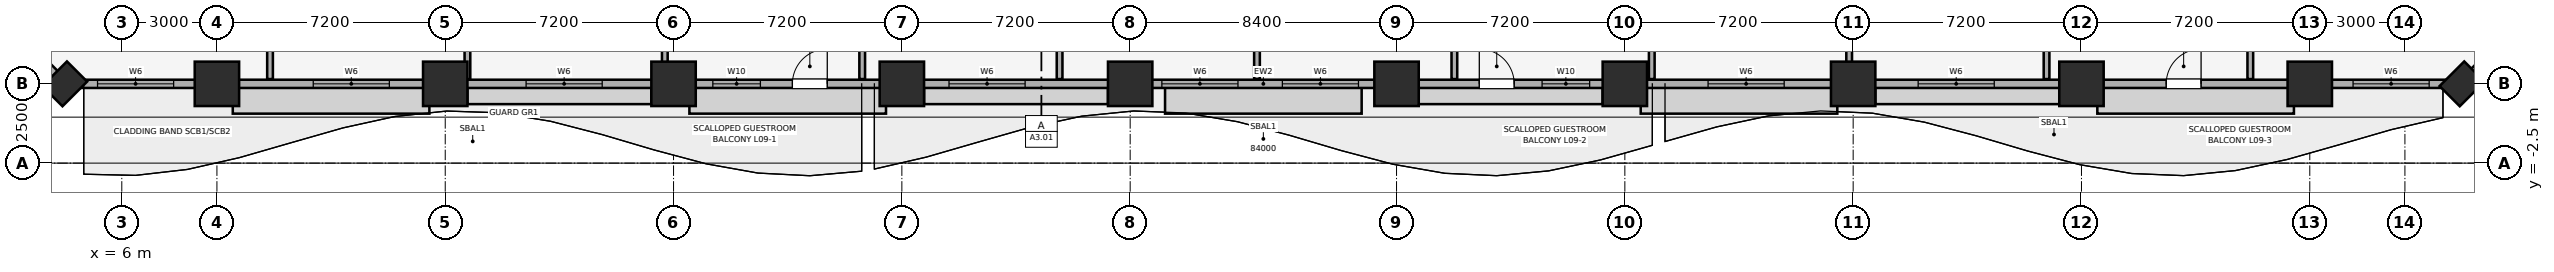
"""IFC4 building model, lengths in metres.
Left out: names, types, materials, properties, quantities, classifications, styles, units other than length and angle.
Written with IfcOpenShell. Run it as: python <this file> out.ifc"""

import sys

from ifc_helpers import new_model, si_unit, direction, frame, frame_2d, origin, origin_2d, place, context, subcontext, project, spatial, rectangle, extrude, element, fill, save


model = new_model("IFC4")
c1 = context("Model", 3, precision=1e-05, world=origin(), true_north=direction((0.0, 1.0)))
c2 = subcontext(c1, "Body", "Model", "MODEL_VIEW")
j1 = project(units=[si_unit("LENGTHUNIT", "METRE"), si_unit("PLANEANGLEUNIT", "RADIAN")], contexts=[c1])
p1 = place(None, origin())
s1 = spatial("IfcSite", under=j1, at=p1, CompositionType="ELEMENT")
p2 = place(p1, origin())
s2 = spatial("IfcBuilding", under=s1, at=p2, CompositionType="ELEMENT")
p3 = place(p2, frame((0.0, 0.0, 46.4)))
s3 = spatial("IfcBuildingStorey", under=s2, at=p3, CompositionType="ELEMENT", Elevation=46.4)
for number, where, z_axis, x_axis in (
    (1, (9.0, 0.0, 0.0), (0.0, 0.0, 1.0), (1.0, 0.0, 0.0)),
    (2, (16.2, 0.0, 0.0), (0.0, 0.0, 1.0), (1.0, 0.0, 0.0)),
    (3, (23.4, 0.0, 0.0), (0.0, 0.0, 1.0), (1.0, 0.0, 0.0)),
    (4, (30.6, 0.0, 0.0), (0.0, 0.0, 1.0), (1.0, 0.0, 0.0)),
    (5, (37.8, 0.0, 0.0), (0.0, 0.0, 1.0), (1.0, 0.0, 0.0)),
    (6, (46.2, 0.0, 0.0), (0.0, 0.0, 1.0), (1.0, 0.0, 0.0)),
    (7, (53.4, 0.0, 0.0), (0.0, 0.0, 1.0), (1.0, 0.0, 0.0)),
    (8, (60.6, 0.0, 0.0), (0.0, 0.0, 1.0), (1.0, 0.0, 0.0)),
    (9, (67.8, 0.0, 0.0), (0.0, 0.0, 1.0), (1.0, 0.0, 0.0)),
    (10, (75.0, 0.0, 0.0), (0.0, 0.0, 1.0), (1.0, 0.0, 0.0)),
):
    element("IfcColumn", number, at=place(p3, frame(where, z_axis=z_axis, x_axis=x_axis)), inside=s3, PredefinedType="COLUMN", context=c2, shape_type="SweptSolid", body=[
        extrude(rectangle(XDim=1.4, YDim=1.4, at=origin_2d()), origin(), (0.0, 0.0, 1.0), 3.51),
    ])
for number, where, z_axis, x_axis in (
    (11, (4.2, 0.0, 0.0), (0.0, 0.0, 1.0), (0.707, 0.707, 0.0)),
    (12, (79.8, 0.0, 0.0), (0.0, 0.0, 1.0), (0.707, 0.707, 0.0)),
):
    element("IfcColumn", number, at=place(p3, frame(where, z_axis=z_axis, x_axis=x_axis)), inside=s3, PredefinedType="PILASTER", context=c2, shape_type="SweptSolid", body=[
        extrude(rectangle(XDim=1.1, YDim=0.9, at=origin_2d()), origin(), (0.0, 0.0, 1.0), 3.51),
    ])
p4 = place(p3, frame((4.2, 0.0, 0.0), z_axis=(0.0, 0.0, 1.0), x_axis=(1.0, 0.0, 0.0)))
e13 = element("IfcWall", 13, at=p4, inside=s3, PredefinedType="SOLIDWALL", context=c2, shape_type="SweptSolid", body=[
    extrude(rectangle(XDim=75.6, YDim=0.26, at=frame_2d((37.8, 0.0))), origin(), (0.0, 0.0, 1.0), 2.56),
])
p5 = place(p4, frame((22.948, 0.0, 0.0)))
e14 = element("IfcOpeningElement", 14, at=p5, cuts=e13, PredefinedType="OPENING", context=c2, shape_type="SweptSolid", body=[
    extrude(rectangle(XDim=1.1, YDim=2.15, at=frame_2d((0.55, 1.075))), frame((0.0, 0.14, 0.0), z_axis=(0.0, -1.0, 0.0), x_axis=(1.0, 0.0, 0.0)), (0.0, 0.0, 1.0), 0.28),
])
p6 = place(p4, frame((44.61, 0.0, 0.0)))
e15 = element("IfcOpeningElement", 15, at=p6, cuts=e13, PredefinedType="OPENING", context=c2, shape_type="SweptSolid", body=[
    extrude(rectangle(XDim=1.1, YDim=2.15, at=frame_2d((0.55, 1.075))), frame((0.0, 0.14, 0.0), z_axis=(0.0, -1.0, 0.0), x_axis=(1.0, 0.0, 0.0)), (0.0, 0.0, 1.0), 0.28),
])
p7 = place(p4, frame((66.272, 0.0, 0.0)))
e16 = element("IfcOpeningElement", 16, at=p7, cuts=e13, PredefinedType="OPENING", context=c2, shape_type="SweptSolid", body=[
    extrude(rectangle(XDim=1.1, YDim=2.15, at=frame_2d((0.55, 1.075))), frame((0.0, 0.14, 0.0), z_axis=(0.0, -1.0, 0.0), x_axis=(1.0, 0.0, 0.0)), (0.0, 0.0, 1.0), 0.28),
])
p8 = place(p4, frame((1.035, 0.0, 0.85)))
e17 = element("IfcOpeningElement", 17, at=p8, cuts=e13, PredefinedType="OPENING", context=c2, shape_type="SweptSolid", body=[
    extrude(rectangle(XDim=2.4, YDim=1.5, at=frame_2d((1.2, 0.75))), frame((0.0, 0.14, 0.0), z_axis=(0.0, -1.0, 0.0), x_axis=(1.0, 0.0, 0.0)), (0.0, 0.0, 1.0), 0.28),
])
p9 = place(p4, frame((7.837, 0.0, 0.85)))
e18 = element("IfcOpeningElement", 18, at=p9, cuts=e13, PredefinedType="OPENING", context=c2, shape_type="SweptSolid", body=[
    extrude(rectangle(XDim=2.4, YDim=1.5, at=frame_2d((1.2, 0.75))), frame((0.0, 0.14, 0.0), z_axis=(0.0, -1.0, 0.0), x_axis=(1.0, 0.0, 0.0)), (0.0, 0.0, 1.0), 0.28),
])
p10 = place(p4, frame((14.55, 0.0, 0.85)))
e19 = element("IfcOpeningElement", 19, at=p10, cuts=e13, PredefinedType="OPENING", context=c2, shape_type="SweptSolid", body=[
    extrude(rectangle(XDim=2.4, YDim=1.5, at=frame_2d((1.2, 0.75))), frame((0.0, 0.14, 0.0), z_axis=(0.0, -1.0, 0.0), x_axis=(1.0, 0.0, 0.0)), (0.0, 0.0, 1.0), 0.28),
])
p11 = place(p4, frame((20.439, 0.0, 0.85)))
e20 = element("IfcOpeningElement", 20, at=p11, cuts=e13, PredefinedType="OPENING", context=c2, shape_type="SweptSolid", body=[
    extrude(rectangle(XDim=1.5, YDim=1.4, at=frame_2d((0.75, 0.7))), frame((0.0, 0.14, 0.0), z_axis=(0.0, -1.0, 0.0), x_axis=(1.0, 0.0, 0.0)), (0.0, 0.0, 1.0), 0.28),
])
p12 = place(p4, frame((27.887, 0.0, 0.85)))
e21 = element("IfcOpeningElement", 21, at=p12, cuts=e13, PredefinedType="OPENING", context=c2, shape_type="SweptSolid", body=[
    extrude(rectangle(XDim=2.4, YDim=1.5, at=frame_2d((1.2, 0.75))), frame((0.0, 0.14, 0.0), z_axis=(0.0, -1.0, 0.0), x_axis=(1.0, 0.0, 0.0)), (0.0, 0.0, 1.0), 0.28),
])
p13 = place(p4, frame((34.6, 0.0, 0.85)))
e22 = element("IfcOpeningElement", 22, at=p13, cuts=e13, PredefinedType="OPENING", context=c2, shape_type="SweptSolid", body=[
    extrude(rectangle(XDim=2.4, YDim=1.5, at=frame_2d((1.2, 0.75))), frame((0.0, 0.14, 0.0), z_axis=(0.0, -1.0, 0.0), x_axis=(1.0, 0.0, 0.0)), (0.0, 0.0, 1.0), 0.28),
])
p14 = place(p4, frame((38.399, 0.0, 0.85)))
e23 = element("IfcOpeningElement", 23, at=p14, cuts=e13, PredefinedType="OPENING", context=c2, shape_type="SweptSolid", body=[
    extrude(rectangle(XDim=2.4, YDim=1.5, at=frame_2d((1.2, 0.75))), frame((0.0, 0.14, 0.0), z_axis=(0.0, -1.0, 0.0), x_axis=(1.0, 0.0, 0.0)), (0.0, 0.0, 1.0), 0.28),
])
p15 = place(p4, frame((46.59, 0.0, 0.85)))
e24 = element("IfcOpeningElement", 24, at=p15, cuts=e13, PredefinedType="OPENING", context=c2, shape_type="SweptSolid", body=[
    extrude(rectangle(XDim=1.5, YDim=1.4, at=frame_2d((0.75, 0.7))), frame((0.0, 0.14, 0.0), z_axis=(0.0, -1.0, 0.0), x_axis=(1.0, 0.0, 0.0)), (0.0, 0.0, 1.0), 0.28),
])
p16 = place(p4, frame((51.824, 0.0, 0.85)))
e25 = element("IfcOpeningElement", 25, at=p16, cuts=e13, PredefinedType="OPENING", context=c2, shape_type="SweptSolid", body=[
    extrude(rectangle(XDim=2.4, YDim=1.5, at=frame_2d((1.2, 0.75))), frame((0.0, 0.14, 0.0), z_axis=(0.0, -1.0, 0.0), x_axis=(1.0, 0.0, 0.0)), (0.0, 0.0, 1.0), 0.28),
])
p17 = place(p4, frame((58.449, 0.0, 0.85)))
e26 = element("IfcOpeningElement", 26, at=p17, cuts=e13, PredefinedType="OPENING", context=c2, shape_type="SweptSolid", body=[
    extrude(rectangle(XDim=2.4, YDim=1.5, at=frame_2d((1.2, 0.75))), frame((0.0, 0.14, 0.0), z_axis=(0.0, -1.0, 0.0), x_axis=(1.0, 0.0, 0.0)), (0.0, 0.0, 1.0), 0.28),
])
p18 = place(p4, frame((72.165, 0.0, 0.85)))
e27 = element("IfcOpeningElement", 27, at=p18, cuts=e13, PredefinedType="OPENING", context=c2, shape_type="SweptSolid", body=[
    extrude(rectangle(XDim=2.4, YDim=1.5, at=frame_2d((1.2, 0.75))), frame((0.0, 0.14, 0.0), z_axis=(0.0, -1.0, 0.0), x_axis=(1.0, 0.0, 0.0)), (0.0, 0.0, 1.0), 0.28),
])
for number, where, z_axis, x_axis in (
    (28, (79.8, 0.0, 0.0), (0.0, 0.0, 1.0), (0.707, 0.707, 0.0)),
    (29, (0.0, 4.2, 0.0), (0.0, 0.0, 1.0), (0.707, -0.707, 0.0)),
):
    element("IfcWall", number, at=place(p3, frame(where, z_axis=z_axis, x_axis=x_axis)), inside=s3, PredefinedType="SOLIDWALL", context=c2, shape_type="SweptSolid", body=[
        extrude(rectangle(XDim=5.94, YDim=0.26, at=frame_2d((2.97, 0.0))), origin(), (0.0, 0.0, 1.0), 2.56),
    ])
for number, where, z_axis, x_axis in (
    (30, (10.675, 0.15, 0.0), (0.0, 0.0, 1.0), (0.0, 1.0, 0.0)),
    (31, (16.9, 0.15, 0.0), (0.0, 0.0, 1.0), (0.0, 1.0, 0.0)),
):
    element("IfcWall", number, at=place(p3, frame(where, z_axis=z_axis, x_axis=x_axis)), inside=s3, PredefinedType="PARTITIONING", context=c2, shape_type="SweptSolid", body=[
        extrude(rectangle(XDim=9.955, YDim=0.18, at=frame_2d((4.978, 0.0))), origin(), (0.0, 0.0, 1.0), 3.51),
    ])
p19 = place(p3, frame((23.125, 0.15, 0.0), z_axis=(0.0, 0.0, 1.0), x_axis=(0.0, 1.0, 0.0)))
e32 = element("IfcWall", 32, at=p19, inside=s3, PredefinedType="PARTITIONING", context=c2, shape_type="SweptSolid", body=[
    extrude(rectangle(XDim=9.955, YDim=0.18, at=frame_2d((4.978, 0.0))), origin(), (0.0, 0.0, 1.0), 2.88),
])
for number, where, z_axis, x_axis in (
    (33, (29.35, 0.15, 0.0), (0.0, 0.0, 1.0), (0.0, 1.0, 0.0)),
    (34, (35.574, 0.15, 0.0), (0.0, 0.0, 1.0), (0.0, 1.0, 0.0)),
):
    element("IfcWall", number, at=place(p3, frame(where, z_axis=z_axis, x_axis=x_axis)), inside=s3, PredefinedType="PARTITIONING", context=c2, shape_type="SweptSolid", body=[
        extrude(rectangle(XDim=9.955, YDim=0.18, at=frame_2d((4.978, 0.0))), origin(), (0.0, 0.0, 1.0), 3.51),
    ])
p20 = place(p3, frame((41.799, 0.15, 0.0), z_axis=(0.0, 0.0, 1.0), x_axis=(0.0, 1.0, 0.0)))
e35 = element("IfcWall", 35, at=p20, inside=s3, PredefinedType="PARTITIONING", context=c2, shape_type="SweptSolid", body=[
    extrude(rectangle(XDim=9.955, YDim=0.18, at=frame_2d((4.978, 0.0))), origin(), (0.0, 0.0, 1.0), 2.898),
])
for number, where, z_axis, x_axis in (
    (36, (48.024, 0.15, 0.0), (0.0, 0.0, 1.0), (0.0, 1.0, 0.0)),
    (37, (54.249, 0.15, 0.0), (0.0, 0.0, 1.0), (0.0, 1.0, 0.0)),
):
    element("IfcWall", number, at=place(p3, frame(where, z_axis=z_axis, x_axis=x_axis)), inside=s3, PredefinedType="PARTITIONING", context=c2, shape_type="SweptSolid", body=[
        extrude(rectangle(XDim=9.955, YDim=0.18, at=frame_2d((4.978, 0.0))), origin(), (0.0, 0.0, 1.0), 3.51),
    ])
p21 = place(p3, frame((60.474, 0.15, 0.0), z_axis=(0.0, 0.0, 1.0), x_axis=(0.0, 1.0, 0.0)))
e38 = element("IfcWall", 38, at=p21, inside=s3, PredefinedType="PARTITIONING", context=c2, shape_type="SweptSolid", body=[
    extrude(rectangle(XDim=9.955, YDim=0.18, at=frame_2d((4.978, 0.0))), origin(), (0.0, 0.0, 1.0), 2.898),
])
for number, where, z_axis, x_axis in (
    (39, (66.699, 0.15, 0.0), (0.0, 0.0, 1.0), (0.0, 1.0, 0.0)),
    (40, (73.124, 0.15, 0.0), (0.0, 0.0, 1.0), (0.0, 1.0, 0.0)),
):
    element("IfcWall", number, at=place(p3, frame(where, z_axis=z_axis, x_axis=x_axis)), inside=s3, PredefinedType="PARTITIONING", context=c2, shape_type="SweptSolid", body=[
        extrude(rectangle(XDim=9.955, YDim=0.18, at=frame_2d((4.978, 0.0))), origin(), (0.0, 0.0, 1.0), 3.51),
    ])
p22 = place(p5, origin())
e41 = element("IfcDoor", 41, at=p22, inside=s3, OperationType="SINGLE_SWING_RIGHT", PredefinedType="DOOR", context=c2, shape_type="SweptSolid", body=[
    extrude(rectangle(XDim=1.1, YDim=2.15, at=frame_2d((0.55, 1.075))), frame((0.0, 0.025, 0.0), z_axis=(0.0, -1.0, 0.0), x_axis=(1.0, 0.0, 0.0)), (0.0, 0.0, 1.0), 0.05),
])
fill(e14, e41)
p23 = place(p6, origin())
e42 = element("IfcDoor", 42, at=p23, inside=s3, OperationType="SINGLE_SWING_LEFT", PredefinedType="DOOR", context=c2, shape_type="SweptSolid", body=[
    extrude(rectangle(XDim=1.1, YDim=2.15, at=frame_2d((0.55, 1.075))), frame((0.0, 0.025, 0.0), z_axis=(0.0, -1.0, 0.0), x_axis=(1.0, 0.0, 0.0)), (0.0, 0.0, 1.0), 0.05),
])
fill(e15, e42)
p24 = place(p7, origin())
e43 = element("IfcDoor", 43, at=p24, inside=s3, OperationType="SINGLE_SWING_RIGHT", PredefinedType="DOOR", context=c2, shape_type="SweptSolid", body=[
    extrude(rectangle(XDim=1.1, YDim=2.15, at=frame_2d((0.55, 1.075))), frame((0.0, 0.025, 0.0), z_axis=(0.0, -1.0, 0.0), x_axis=(1.0, 0.0, 0.0)), (0.0, 0.0, 1.0), 0.05),
])
fill(e16, e43)
p25 = place(p8, origin())
e44 = element("IfcWindow", 44, at=p25, inside=s3, PartitioningType="SINGLE_PANEL", PredefinedType="WINDOW", context=c2, shape_type="SweptSolid", body=[
    extrude(rectangle(XDim=2.4, YDim=1.5, at=frame_2d((1.2, 0.75))), frame((0.0, 0.03, 0.0), z_axis=(0.0, -1.0, 0.0), x_axis=(1.0, 0.0, 0.0)), (0.0, 0.0, 1.0), 0.06),
])
fill(e17, e44)
p26 = place(p9, origin())
e45 = element("IfcWindow", 45, at=p26, inside=s3, PartitioningType="SINGLE_PANEL", PredefinedType="WINDOW", context=c2, shape_type="SweptSolid", body=[
    extrude(rectangle(XDim=2.4, YDim=1.5, at=frame_2d((1.2, 0.75))), frame((0.0, 0.03, 0.0), z_axis=(0.0, -1.0, 0.0), x_axis=(1.0, 0.0, 0.0)), (0.0, 0.0, 1.0), 0.06),
])
fill(e18, e45)
p27 = place(p10, origin())
e46 = element("IfcWindow", 46, at=p27, inside=s3, PartitioningType="SINGLE_PANEL", PredefinedType="WINDOW", context=c2, shape_type="SweptSolid", body=[
    extrude(rectangle(XDim=2.4, YDim=1.5, at=frame_2d((1.2, 0.75))), frame((0.0, 0.03, 0.0), z_axis=(0.0, -1.0, 0.0), x_axis=(1.0, 0.0, 0.0)), (0.0, 0.0, 1.0), 0.06),
])
fill(e19, e46)
p28 = place(p11, origin())
e47 = element("IfcWindow", 47, at=p28, inside=s3, PartitioningType="SINGLE_PANEL", PredefinedType="WINDOW", context=c2, shape_type="SweptSolid", body=[
    extrude(rectangle(XDim=1.5, YDim=1.4, at=frame_2d((0.75, 0.7))), frame((0.0, 0.03, 0.0), z_axis=(0.0, -1.0, 0.0), x_axis=(1.0, 0.0, 0.0)), (0.0, 0.0, 1.0), 0.06),
])
fill(e20, e47)
p29 = place(p12, origin())
e48 = element("IfcWindow", 48, at=p29, inside=s3, PartitioningType="SINGLE_PANEL", PredefinedType="WINDOW", context=c2, shape_type="SweptSolid", body=[
    extrude(rectangle(XDim=2.4, YDim=1.5, at=frame_2d((1.2, 0.75))), frame((0.0, 0.03, 0.0), z_axis=(0.0, -1.0, 0.0), x_axis=(1.0, 0.0, 0.0)), (0.0, 0.0, 1.0), 0.06),
])
fill(e21, e48)
p30 = place(p13, origin())
e49 = element("IfcWindow", 49, at=p30, inside=s3, PartitioningType="SINGLE_PANEL", PredefinedType="WINDOW", context=c2, shape_type="SweptSolid", body=[
    extrude(rectangle(XDim=2.4, YDim=1.5, at=frame_2d((1.2, 0.75))), frame((0.0, 0.03, 0.0), z_axis=(0.0, -1.0, 0.0), x_axis=(1.0, 0.0, 0.0)), (0.0, 0.0, 1.0), 0.06),
])
fill(e22, e49)
p31 = place(p14, origin())
e50 = element("IfcWindow", 50, at=p31, inside=s3, PartitioningType="SINGLE_PANEL", PredefinedType="WINDOW", context=c2, shape_type="SweptSolid", body=[
    extrude(rectangle(XDim=2.4, YDim=1.5, at=frame_2d((1.2, 0.75))), frame((0.0, 0.03, 0.0), z_axis=(0.0, -1.0, 0.0), x_axis=(1.0, 0.0, 0.0)), (0.0, 0.0, 1.0), 0.06),
])
fill(e23, e50)
p32 = place(p15, origin())
e51 = element("IfcWindow", 51, at=p32, inside=s3, PartitioningType="SINGLE_PANEL", PredefinedType="WINDOW", context=c2, shape_type="SweptSolid", body=[
    extrude(rectangle(XDim=1.5, YDim=1.4, at=frame_2d((0.75, 0.7))), frame((0.0, 0.03, 0.0), z_axis=(0.0, -1.0, 0.0), x_axis=(1.0, 0.0, 0.0)), (0.0, 0.0, 1.0), 0.06),
])
fill(e24, e51)
p33 = place(p16, origin())
e52 = element("IfcWindow", 52, at=p33, inside=s3, PartitioningType="SINGLE_PANEL", PredefinedType="WINDOW", context=c2, shape_type="SweptSolid", body=[
    extrude(rectangle(XDim=2.4, YDim=1.5, at=frame_2d((1.2, 0.75))), frame((0.0, 0.03, 0.0), z_axis=(0.0, -1.0, 0.0), x_axis=(1.0, 0.0, 0.0)), (0.0, 0.0, 1.0), 0.06),
])
fill(e25, e52)
p34 = place(p17, origin())
e53 = element("IfcWindow", 53, at=p34, inside=s3, PartitioningType="SINGLE_PANEL", PredefinedType="WINDOW", context=c2, shape_type="SweptSolid", body=[
    extrude(rectangle(XDim=2.4, YDim=1.5, at=frame_2d((1.2, 0.75))), frame((0.0, 0.03, 0.0), z_axis=(0.0, -1.0, 0.0), x_axis=(1.0, 0.0, 0.0)), (0.0, 0.0, 1.0), 0.06),
])
fill(e26, e53)
p35 = place(p18, origin())
e54 = element("IfcWindow", 54, at=p35, inside=s3, PartitioningType="SINGLE_PANEL", PredefinedType="WINDOW", context=c2, shape_type="SweptSolid", body=[
    extrude(rectangle(XDim=2.4, YDim=1.5, at=frame_2d((1.2, 0.75))), frame((0.0, 0.03, 0.0), z_axis=(0.0, -1.0, 0.0), x_axis=(1.0, 0.0, 0.0)), (0.0, 0.0, 1.0), 0.06),
])
fill(e27, e54)
save(model, sys.argv[1])
